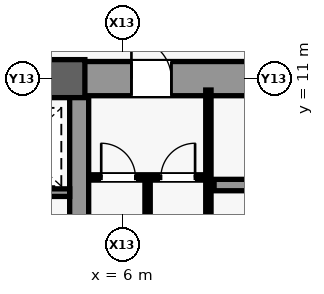
"""IFC4 building model, lengths in metres.
Left out: names, types, materials, properties, quantities, classifications, styles, units other than length and angle.
Written with IfcOpenShell. Run it as: python <this file> out.ifc"""

import sys

from ifc_helpers import new_model, si_unit, direction, frame, frame_2d, origin, origin_2d, place, context, subcontext, project, spatial, rectangle, extrude, source, transform, mapped, element, fill, save


model = new_model("IFC4")
c1 = context("Model", 3, precision=1e-05, world=origin(), true_north=direction((0.0, 1.0)))
c2 = subcontext(c1, "Body", "Model", "MODEL_VIEW")
j1 = project(units=[si_unit("LENGTHUNIT", "METRE"), si_unit("PLANEANGLEUNIT", "RADIAN")], contexts=[c1])
p1 = place(None, origin())
s1 = spatial("IfcSite", under=j1, at=p1, CompositionType="ELEMENT")
p2 = place(p1, origin())
s2 = spatial("IfcBuilding", under=s1, at=p2, CompositionType="ELEMENT")
p3 = place(p2, frame((0.0, 0.0, 17.4)))
s3 = spatial("IfcBuildingStorey", under=s2, at=p3, CompositionType="ELEMENT", Elevation=17.4)
m1 = source(origin(), c2, "Body", "SweptSolid", [
    extrude(rectangle(XDim=21.4, YDim=0.5, at=frame_2d((10.7, 0.0))), origin(), (0.0, 0.0, 1.0), 4.48),
])
p4 = place(p3, frame((4.85, -10.7, 0.0), z_axis=(0.0, 0.0, 1.0), x_axis=(0.0, 1.0, 0.0)))
e1 = element("IfcWall", 1, at=p4, inside=s3, PredefinedType="SHEAR", context=c2, shape_type="MappedRepresentation", body=[
    mapped(m1, transform((0.0, 0.0, 0.0), scale=1.0)),
])
m2 = source(origin(), c2, "Body", "SweptSolid", [
    extrude(rectangle(XDim=5.85, YDim=0.9, at=frame_2d((2.925, 0.0))), origin(), (0.0, 0.0, 1.0), 4.48),
])
p5 = place(p3, frame((4.85, 11.0, 0.0), z_axis=(0.0, 0.0, 1.0), x_axis=(1.0, 0.0, 0.0)))
e2 = element("IfcWall", 2, at=p5, inside=s3, PredefinedType="SHEAR", context=c2, shape_type="MappedRepresentation", body=[
    mapped(m2, transform((0.0, 0.0, 0.0), scale=1.0)),
])
m3 = source(origin(), c2, "Body", "SweptSolid", [
    extrude(rectangle(XDim=1.05, YDim=2.2, at=frame_2d((0.525, 1.1))), frame((0.0, 0.46, 0.0), z_axis=(0.0, -1.0, 0.0), x_axis=(1.0, 0.0, 0.0)), (0.0, 0.0, 1.0), 0.92),
])
p6 = place(p5, frame((1.375, 0.0, 0.0)))
e3 = element("IfcOpeningElement", 3, at=p6, cuts=e2, PredefinedType="OPENING", context=c2, shape_type="MappedRepresentation", body=[
    mapped(m3, transform((0.0, 0.0, 0.0), scale=1.0)),
])
m4 = source(origin(), c2, "Body", "SweptSolid", [
    extrude(rectangle(XDim=9.2, YDim=0.5, at=frame_2d((4.6, 0.0))), origin(), (0.0, 0.0, 1.0), 4.48),
])
p7 = place(p3, frame((-4.6, 11.0, 0.0), z_axis=(0.0, 0.0, 1.0), x_axis=(1.0, 0.0, 0.0)))
e4 = element("IfcWall", 4, at=p7, inside=s3, PredefinedType="SHEAR", context=c2, shape_type="MappedRepresentation", body=[
    mapped(m4, transform((0.0, 0.0, 0.0), scale=1.0)),
])
m5 = source(origin(), c2, "Body", "SweptSolid", [
    extrude(rectangle(XDim=1.8, YDim=2.25, at=frame_2d((0.9, 1.125))), frame((0.0, 0.26, 0.0), z_axis=(0.0, -1.0, 0.0), x_axis=(1.0, 0.0, 0.0)), (0.0, 0.0, 1.0), 0.52),
])
p8 = place(p7, frame((3.7, 0.0, 0.0)))
e5 = element("IfcOpeningElement", 5, at=p8, cuts=e4, PredefinedType="OPENING", context=c2, shape_type="MappedRepresentation", body=[
    mapped(m5, transform((0.0, 0.0, 0.0), scale=1.0)),
])
m6 = source(origin(), c2, "Body", "SweptSolid", [
    extrude(rectangle(XDim=1.0, YDim=1.0, at=origin_2d()), origin(), (0.0, 0.0, 1.0), 4.8),
])
p9 = place(p3, frame((4.5, 11.0, 0.0), z_axis=(0.0, 0.0, 1.0), x_axis=(1.0, 0.0, 0.0)))
e6 = element("IfcColumn", 6, at=p9, inside=s3, PredefinedType="COLUMN", context=c2, shape_type="MappedRepresentation", body=[
    mapped(m6, transform((0.0, 0.0, 0.0), scale=1.0)),
])
m7 = source(origin(), c2, "Body", "SweptSolid", [
    extrude(rectangle(XDim=2.3, YDim=0.3, at=frame_2d((1.15, 0.0))), origin(), (0.0, 0.0, 1.0), 4.48),
])
p10 = place(p3, frame((8.4, 8.2, 0.0), z_axis=(0.0, 0.0, 1.0), x_axis=(1.0, 0.0, 0.0)))
e7 = element("IfcWall", 7, at=p10, inside=s3, PredefinedType="SHEAR", context=c2, shape_type="MappedRepresentation", body=[
    mapped(m7, transform((0.0, 0.0, 0.0), scale=1.0)),
])
m8 = source(origin(), c2, "Body", "SweptSolid", [
    extrude(rectangle(XDim=9.4, YDim=0.14, at=frame_2d((4.7, 0.0))), origin(), (0.0, 0.0, 1.0), 4.48),
])
p11 = place(p3, frame((8.25, 1.3, 0.0), z_axis=(0.0, 0.0, 1.0), x_axis=(0.0, 1.0, 0.0)))
e8 = element("IfcWall", 8, at=p11, inside=s3, PredefinedType="PARTITIONING", context=c2, shape_type="MappedRepresentation", body=[
    mapped(m8, transform((0.0, 0.0, 0.0), scale=1.0)),
])
m9 = source(origin(), c2, "Body", "SweptSolid", [
    extrude(rectangle(XDim=3.15, YDim=0.14, at=frame_2d((1.575, 0.0))), origin(), (0.0, 0.0, 1.0), 4.48),
])
p12 = place(p3, frame((5.1, 8.4, 0.0), z_axis=(0.0, 0.0, 1.0), x_axis=(1.0, 0.0, 0.0)))
e9 = element("IfcWall", 9, at=p12, inside=s3, PredefinedType="PARTITIONING", context=c2, shape_type="MappedRepresentation", body=[
    mapped(m9, transform((0.0, 0.0, 0.0), scale=1.0)),
])
m10 = source(origin(), c2, "Body", "SweptSolid", [
    extrude(rectangle(XDim=0.9, YDim=2.15, at=frame_2d((0.45, 1.075))), frame((0.0, 0.08, 0.0), z_axis=(0.0, -1.0, 0.0), x_axis=(1.0, 0.0, 0.0)), (0.0, 0.0, 1.0), 0.16),
])
p13 = place(p12, frame((0.33, 0.0, 0.0)))
e10 = element("IfcOpeningElement", 10, at=p13, cuts=e9, PredefinedType="OPENING", context=c2, shape_type="MappedRepresentation", body=[
    mapped(m10, transform((0.0, 0.0, 0.0), scale=1.0)),
])
p14 = place(p12, frame((1.9, 0.0, 0.0)))
e11 = element("IfcOpeningElement", 11, at=p14, cuts=e9, PredefinedType="OPENING", context=c2, shape_type="MappedRepresentation", body=[
    mapped(m10, transform((0.0, 0.0, 0.0), scale=1.0)),
])
m11 = source(origin(), c2, "Body", "SweptSolid", [
    extrude(rectangle(XDim=7.1, YDim=0.14, at=frame_2d((3.55, 0.0))), origin(), (0.0, 0.0, 1.0), 4.48),
])
p15 = place(p3, frame((6.65, 1.3, 0.0), z_axis=(0.0, 0.0, 1.0), x_axis=(0.0, 1.0, 0.0)))
e12 = element("IfcWall", 12, at=p15, inside=s3, PredefinedType="PARTITIONING", context=c2, shape_type="MappedRepresentation", body=[
    mapped(m11, transform((0.0, 0.0, 0.0), scale=1.0)),
])
p16 = place(p15, frame((1.3, 0.0, 0.0)))
e13 = element("IfcOpeningElement", 13, at=p16, cuts=e12, PredefinedType="OPENING", context=c2, shape_type="MappedRepresentation", body=[
    mapped(m10, transform((0.0, 0.0, 0.0), scale=1.0)),
])
m12 = source(origin(), c2, "Body", "SweptSolid", [
    extrude(rectangle(XDim=2.45, YDim=0.2, at=frame_2d((1.225, 0.0))), origin(), (0.0, 0.0, 1.0), 4.48),
])
p17 = place(p3, frame((2.15, 8.0, 0.0), z_axis=(0.0, 0.0, 1.0), x_axis=(1.0, 0.0, 0.0)))
e14 = element("IfcWall", 14, at=p17, inside=s3, PredefinedType="SHEAR", context=c2, shape_type="MappedRepresentation", body=[
    mapped(m12, transform((0.0, 0.0, 0.0), scale=1.0)),
])
m13 = source(origin(), c2, "Body", "SweptSolid", [
    extrude(rectangle(XDim=1.05, YDim=2.2, at=frame_2d((0.525, 1.1))), frame((0.0, 0.025, 0.0), z_axis=(0.0, -1.0, 0.0), x_axis=(1.0, 0.0, 0.0)), (0.0, 0.0, 1.0), 0.05),
])
p18 = place(p6, origin())
e15 = element("IfcDoor", 15, at=p18, inside=s3, OperationType="SINGLE_SWING_LEFT", PredefinedType="DOOR", context=c2, shape_type="MappedRepresentation", body=[
    mapped(m13, transform((0.0, 0.0, 0.0), scale=1.0)),
])
fill(e3, e15)
m14 = source(origin(), c2, "Body", "SweptSolid", [
    extrude(rectangle(XDim=0.9, YDim=2.15, at=frame_2d((0.45, 1.075))), frame((0.0, 0.025, 0.0), z_axis=(0.0, -1.0, 0.0), x_axis=(1.0, 0.0, 0.0)), (0.0, 0.0, 1.0), 0.05),
])
p19 = place(p13, origin())
e16 = element("IfcDoor", 16, at=p19, inside=s3, OperationType="SINGLE_SWING_LEFT", PredefinedType="DOOR", context=c2, shape_type="MappedRepresentation", body=[
    mapped(m14, transform((0.0, 0.0, 0.0), scale=1.0)),
])
fill(e10, e16)
p20 = place(p14, origin())
e17 = element("IfcDoor", 17, at=p20, inside=s3, OperationType="SINGLE_SWING_RIGHT", PredefinedType="DOOR", context=c2, shape_type="MappedRepresentation", body=[
    mapped(m14, transform((0.0, 0.0, 0.0), scale=1.0)),
])
fill(e11, e17)
save(model, sys.argv[1])
